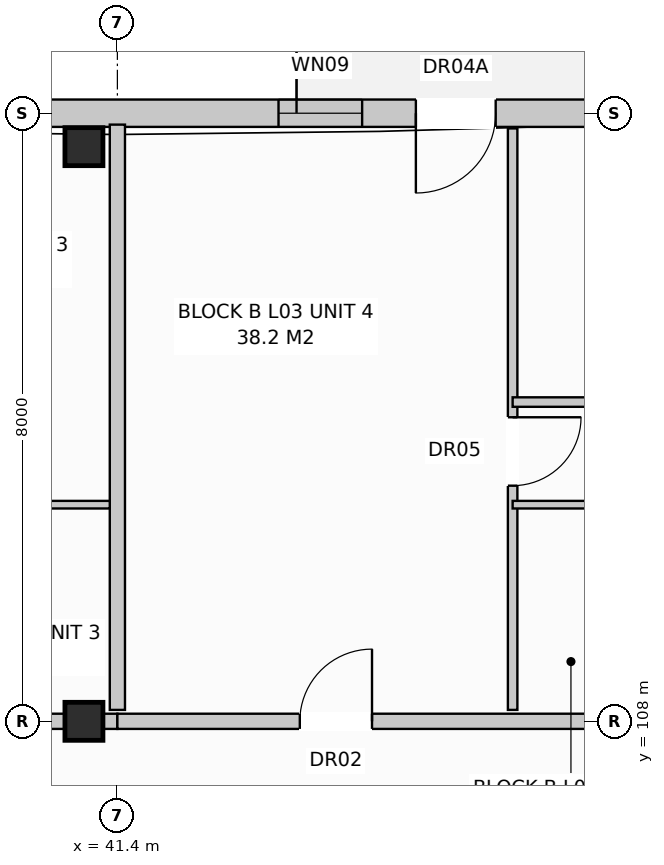
"""IFC4 building model, lengths in metres.
Left out: names, types, materials, properties, quantities, classifications, styles, units other than length and angle.
Written with IfcOpenShell. Run it as: python <this file> out.ifc"""

import sys

from ifc_helpers import new_model, si_unit, direction, frame, frame_2d, origin, origin_with_axes, origin_2d, place, context, subcontext, project, spatial, rectangle, extrude, element, fill, save


model = new_model("IFC4")
c1 = context("Model", 3, precision=1e-05, world=origin(), true_north=direction((0.0, 1.0)))
c2 = subcontext(c1, "Body", "Model", "MODEL_VIEW")
j1 = project(units=[si_unit("LENGTHUNIT", "METRE"), si_unit("PLANEANGLEUNIT", "RADIAN")], contexts=[c1])
p1 = place(None, origin())
s1 = spatial("IfcSite", under=j1, at=p1, CompositionType="ELEMENT")
p2 = place(p1, origin())
s2 = spatial("IfcBuilding", under=s1, at=p2, CompositionType="ELEMENT")
p3 = place(p2, frame((0.0, 0.0, 11.2)))
s3 = spatial("IfcBuildingStorey", under=s2, at=p3, CompositionType="ELEMENT", Elevation=11.2)
for number, where, z_axis, x_axis in (
    (1, (40.96, 108.0, 0.0), (0.0, 0.0, 1.0), (1.0, 0.0, 0.0)),
    (2, (40.96, 115.56, 0.0), (0.0, 0.0, 1.0), (1.0, 0.0, 0.0)),
):
    element("IfcColumn", number, at=place(p3, frame(where, z_axis=z_axis, x_axis=x_axis)), inside=s3, PredefinedType="COLUMN", context=c2, shape_type="SweptSolid", body=[
        extrude(rectangle(XDim=0.5, YDim=0.5, at=origin_2d()), origin(), (0.0, 0.0, 1.0), 3.2),
    ])
p4 = place(p3, frame((0.17, 116.0, 0.0), z_axis=(0.0, 0.0, 1.0), x_axis=(1.0, 0.0, 0.0)))
e3 = element("IfcWall", 3, at=p4, inside=s3, PredefinedType="STANDARD", context=c2, shape_type="SweptSolid", body=[
    extrude(rectangle(XDim=54.86, YDim=0.36, at=frame_2d((27.43, 0.0))), origin(), (0.0, 0.0, 1.0), 2.94),
])
p5 = place(p4, frame((2.777, 0.0, 0.0)))
e4 = element("IfcOpeningElement", 4, at=p5, cuts=e3, PredefinedType="OPENING", context=c2, shape_type="SweptSolid", body=[
    extrude(rectangle(XDim=1.05, YDim=2.12, at=frame_2d((0.525, 1.06))), frame((0.0, 0.192, 0.0), z_axis=(0.0, -1.0, 0.0), x_axis=(1.0, 0.0, 0.0)), (0.0, 0.0, 1.0), 0.384),
])
p6 = place(p4, frame((16.277, 0.0, 0.0)))
e5 = element("IfcOpeningElement", 5, at=p6, cuts=e3, PredefinedType="OPENING", context=c2, shape_type="SweptSolid", body=[
    extrude(rectangle(XDim=1.05, YDim=2.12, at=frame_2d((0.525, 1.06))), frame((0.0, 0.192, 0.0), z_axis=(0.0, -1.0, 0.0), x_axis=(1.0, 0.0, 0.0)), (0.0, 0.0, 1.0), 0.384),
])
p7 = place(p4, frame((30.777, 0.0, 0.0)))
e6 = element("IfcOpeningElement", 6, at=p7, cuts=e3, PredefinedType="OPENING", context=c2, shape_type="SweptSolid", body=[
    extrude(rectangle(XDim=1.05, YDim=2.12, at=frame_2d((0.525, 1.06))), frame((0.0, 0.192, 0.0), z_axis=(0.0, -1.0, 0.0), x_axis=(1.0, 0.0, 0.0)), (0.0, 0.0, 1.0), 0.384),
])
p8 = place(p4, frame((45.157, 0.0, 0.0)))
e7 = element("IfcOpeningElement", 7, at=p8, cuts=e3, PredefinedType="OPENING", context=c2, shape_type="SweptSolid", body=[
    extrude(rectangle(XDim=1.05, YDim=2.12, at=frame_2d((0.525, 1.06))), frame((0.0, 0.192, 0.0), z_axis=(0.0, -1.0, 0.0), x_axis=(1.0, 0.0, 0.0)), (0.0, 0.0, 1.0), 0.384),
])
p9 = place(p4, frame((1.05, 0.0, 0.72)))
e8 = element("IfcOpeningElement", 8, at=p9, cuts=e3, PredefinedType="OPENING", context=c2, shape_type="SweptSolid", body=[
    extrude(rectangle(XDim=1.1, YDim=1.5, at=frame_2d((0.55, 0.75))), frame((0.0, 0.192, 0.0), z_axis=(0.0, -1.0, 0.0), x_axis=(1.0, 0.0, 0.0)), (0.0, 0.0, 1.0), 0.384),
])
p10 = place(p4, frame((4.325, 0.0, 0.8)))
e9 = element("IfcOpeningElement", 9, at=p10, cuts=e3, PredefinedType="OPENING", context=c2, shape_type="SweptSolid", body=[
    extrude(rectangle(XDim=1.95, YDim=1.65, at=frame_2d((0.975, 0.825))), frame((0.0, 0.192, 0.0), z_axis=(0.0, -1.0, 0.0), x_axis=(1.0, 0.0, 0.0)), (0.0, 0.0, 1.0), 0.384),
])
p11 = place(p4, frame((10.45, 0.0, 0.72)))
e10 = element("IfcOpeningElement", 10, at=p11, cuts=e3, PredefinedType="OPENING", context=c2, shape_type="SweptSolid", body=[
    extrude(rectangle(XDim=1.1, YDim=1.5, at=frame_2d((0.55, 0.75))), frame((0.0, 0.192, 0.0), z_axis=(0.0, -1.0, 0.0), x_axis=(1.0, 0.0, 0.0)), (0.0, 0.0, 1.0), 0.384),
])
p12 = place(p4, frame((14.55, 0.0, 0.72)))
e11 = element("IfcOpeningElement", 11, at=p12, cuts=e3, PredefinedType="OPENING", context=c2, shape_type="SweptSolid", body=[
    extrude(rectangle(XDim=1.1, YDim=1.5, at=frame_2d((0.55, 0.75))), frame((0.0, 0.192, 0.0), z_axis=(0.0, -1.0, 0.0), x_axis=(1.0, 0.0, 0.0)), (0.0, 0.0, 1.0), 0.384),
])
p13 = place(p4, frame((18.025, 0.0, 0.8)))
e12 = element("IfcOpeningElement", 12, at=p13, cuts=e3, PredefinedType="OPENING", context=c2, shape_type="SweptSolid", body=[
    extrude(rectangle(XDim=1.95, YDim=1.65, at=frame_2d((0.975, 0.825))), frame((0.0, 0.192, 0.0), z_axis=(0.0, -1.0, 0.0), x_axis=(1.0, 0.0, 0.0)), (0.0, 0.0, 1.0), 0.384),
])
p14 = place(p4, frame((22.8, 0.0, 0.8)))
e13 = element("IfcOpeningElement", 13, at=p14, cuts=e3, PredefinedType="OPENING", context=c2, shape_type="SweptSolid", body=[
    extrude(rectangle(XDim=1.8, YDim=1.7, at=frame_2d((0.9, 0.85))), frame((0.0, 0.192, 0.0), z_axis=(0.0, -1.0, 0.0), x_axis=(1.0, 0.0, 0.0)), (0.0, 0.0, 1.0), 0.384),
])
p15 = place(p4, frame((28.85, 0.0, 0.72)))
e14 = element("IfcOpeningElement", 14, at=p15, cuts=e3, PredefinedType="OPENING", context=c2, shape_type="SweptSolid", body=[
    extrude(rectangle(XDim=1.1, YDim=1.5, at=frame_2d((0.55, 0.75))), frame((0.0, 0.192, 0.0), z_axis=(0.0, -1.0, 0.0), x_axis=(1.0, 0.0, 0.0)), (0.0, 0.0, 1.0), 0.384),
])
p16 = place(p4, frame((34.825, 0.0, 0.8)))
e15 = element("IfcOpeningElement", 15, at=p16, cuts=e3, PredefinedType="OPENING", context=c2, shape_type="SweptSolid", body=[
    extrude(rectangle(XDim=1.95, YDim=1.65, at=frame_2d((0.975, 0.825))), frame((0.0, 0.192, 0.0), z_axis=(0.0, -1.0, 0.0), x_axis=(1.0, 0.0, 0.0)), (0.0, 0.0, 1.0), 0.384),
])
p17 = place(p4, frame((38.65, 0.0, 0.72)))
e16 = element("IfcOpeningElement", 16, at=p17, cuts=e3, PredefinedType="OPENING", context=c2, shape_type="SweptSolid", body=[
    extrude(rectangle(XDim=1.1, YDim=1.5, at=frame_2d((0.55, 0.75))), frame((0.0, 0.192, 0.0), z_axis=(0.0, -1.0, 0.0), x_axis=(1.0, 0.0, 0.0)), (0.0, 0.0, 1.0), 0.384),
])
p18 = place(p4, frame((43.35, 0.0, 0.72)))
e17 = element("IfcOpeningElement", 17, at=p18, cuts=e3, PredefinedType="OPENING", context=c2, shape_type="SweptSolid", body=[
    extrude(rectangle(XDim=1.1, YDim=1.5, at=frame_2d((0.55, 0.75))), frame((0.0, 0.192, 0.0), z_axis=(0.0, -1.0, 0.0), x_axis=(1.0, 0.0, 0.0)), (0.0, 0.0, 1.0), 0.384),
])
p19 = place(p4, frame((48.583, 0.0, 0.8)))
e18 = element("IfcOpeningElement", 18, at=p19, cuts=e3, PredefinedType="OPENING", context=c2, shape_type="SweptSolid", body=[
    extrude(rectangle(XDim=1.95, YDim=1.65, at=frame_2d((0.975, 0.825))), frame((0.0, 0.192, 0.0), z_axis=(0.0, -1.0, 0.0), x_axis=(1.0, 0.0, 0.0)), (0.0, 0.0, 1.0), 0.384),
])
p20 = place(p4, frame((52.25, 0.0, 0.72)))
e19 = element("IfcOpeningElement", 19, at=p20, cuts=e3, PredefinedType="OPENING", context=c2, shape_type="SweptSolid", body=[
    extrude(rectangle(XDim=1.1, YDim=1.5, at=frame_2d((0.55, 0.75))), frame((0.0, 0.192, 0.0), z_axis=(0.0, -1.0, 0.0), x_axis=(1.0, 0.0, 0.0)), (0.0, 0.0, 1.0), 0.384),
])
p21 = place(p3, frame((41.4, 108.15, 0.0), z_axis=(0.0, 0.0, 1.0), x_axis=(0.0, 1.0, 0.0)))
e20 = element("IfcWall", 20, at=p21, inside=s3, PredefinedType="PARTITIONING", context=c2, shape_type="SweptSolid", body=[
    extrude(rectangle(XDim=7.7, YDim=0.2, at=frame_2d((3.85, 0.0))), origin(), (0.0, 0.0, 1.0), 2.94),
])
p22 = place(p3, frame((20.7, 108.0, 0.0), z_axis=(0.0, 0.0, 1.0), x_axis=(1.0, 0.0, 0.0)))
e21 = element("IfcWall", 21, at=p22, inside=s3, PredefinedType="PARTITIONING", context=c2, shape_type="SweptSolid", body=[
    extrude(rectangle(XDim=20.7, YDim=0.2, at=frame_2d((10.35, 0.0))), origin(), (0.0, 0.0, 1.0), 2.38),
])
p23 = place(p22, frame((2.4, 0.0, 0.0)))
e22 = element("IfcOpeningElement", 22, at=p23, cuts=e21, PredefinedType="OPENING", context=c2, shape_type="SweptSolid", body=[
    extrude(rectangle(XDim=0.95, YDim=2.15, at=frame_2d((0.475, 1.075))), frame((0.0, 0.112, 0.0), z_axis=(0.0, -1.0, 0.0), x_axis=(1.0, 0.0, 0.0)), (0.0, 0.0, 1.0), 0.224),
])
p24 = place(p3, frame((27.0, 110.85, 0.0), z_axis=(0.0, 0.0, 1.0), x_axis=(1.0, 0.0, 0.0)))
e23 = element("IfcWall", 23, at=p24, inside=s3, PredefinedType="PARTITIONING", context=c2, shape_type="SweptSolid", body=[
    extrude(rectangle(XDim=14.3, YDim=0.1, at=frame_2d((7.15, 0.0))), origin(), (0.0, 0.0, 1.0), 2.94),
])
p25 = place(p24, frame((1.6, 0.0, 0.0)))
e24 = element("IfcOpeningElement", 24, at=p25, cuts=e23, PredefinedType="OPENING", context=c2, shape_type="SweptSolid", body=[
    extrude(rectangle(XDim=0.9, YDim=2.1, at=frame_2d((0.45, 1.05))), frame((0.0, 0.062, 0.0), z_axis=(0.0, -1.0, 0.0), x_axis=(1.0, 0.0, 0.0)), (0.0, 0.0, 1.0), 0.124),
])
p26 = place(p24, frame((5.1, 0.0, 0.0)))
e25 = element("IfcOpeningElement", 25, at=p26, cuts=e23, PredefinedType="OPENING", context=c2, shape_type="SweptSolid", body=[
    extrude(rectangle(XDim=0.85, YDim=2.05, at=frame_2d((0.425, 1.025))), frame((0.0, 0.062, 0.0), z_axis=(0.0, -1.0, 0.0), x_axis=(1.0, 0.0, 0.0)), (0.0, 0.0, 1.0), 0.124),
])
p27 = place(p24, frame((8.2, 0.0, 0.0)))
e26 = element("IfcOpeningElement", 26, at=p27, cuts=e23, PredefinedType="OPENING", context=c2, shape_type="SweptSolid", body=[
    extrude(rectangle(XDim=0.85, YDim=2.05, at=frame_2d((0.425, 1.025))), frame((0.0, 0.062, 0.0), z_axis=(0.0, -1.0, 0.0), x_axis=(1.0, 0.0, 0.0)), (0.0, 0.0, 1.0), 0.124),
])
p28 = place(p24, frame((11.6, 0.0, 0.0)))
e27 = element("IfcOpeningElement", 27, at=p28, cuts=e23, PredefinedType="OPENING", context=c2, shape_type="SweptSolid", body=[
    extrude(rectangle(XDim=0.85, YDim=2.05, at=frame_2d((0.425, 1.025))), frame((0.0, 0.062, 0.0), z_axis=(0.0, -1.0, 0.0), x_axis=(1.0, 0.0, 0.0)), (0.0, 0.0, 1.0), 0.124),
])
p29 = place(p3, frame((41.4, 108.0, 0.0), z_axis=(0.0, 0.0, 1.0), x_axis=(1.0, 0.0, 0.0)))
e28 = element("IfcWall", 28, at=p29, inside=s3, PredefinedType="PARTITIONING", context=c2, shape_type="SweptSolid", body=[
    extrude(rectangle(XDim=13.8, YDim=0.2, at=frame_2d((6.9, 0.0))), origin(), (0.0, 0.0, 1.0), 2.38),
])
p30 = place(p29, frame((2.4, 0.0, 0.0)))
e29 = element("IfcOpeningElement", 29, at=p30, cuts=e28, PredefinedType="OPENING", context=c2, shape_type="SweptSolid", body=[
    extrude(rectangle(XDim=0.95, YDim=2.15, at=frame_2d((0.475, 1.075))), frame((0.0, 0.112, 0.0), z_axis=(0.0, -1.0, 0.0), x_axis=(1.0, 0.0, 0.0)), (0.0, 0.0, 1.0), 0.224),
])
p31 = place(p3, frame((46.6, 108.15, 0.0), z_axis=(0.0, 0.0, 1.0), x_axis=(0.0, 1.0, 0.0)))
e30 = element("IfcWall", 30, at=p31, inside=s3, PredefinedType="PARTITIONING", context=c2, shape_type="SweptSolid", body=[
    extrude(rectangle(XDim=7.65, YDim=0.125, at=frame_2d((3.825, 0.0))), origin(), (0.0, 0.0, 1.0), 2.94),
])
p32 = place(p31, frame((2.95, 0.0, 0.0)))
e31 = element("IfcOpeningElement", 31, at=p32, cuts=e30, PredefinedType="OPENING", context=c2, shape_type="SweptSolid", body=[
    extrude(rectangle(XDim=0.9, YDim=2.1, at=frame_2d((0.45, 1.05))), frame((0.0, 0.074, 0.0), z_axis=(0.0, -1.0, 0.0), x_axis=(1.0, 0.0, 0.0)), (0.0, 0.0, 1.0), 0.149),
])
p33 = place(p3, frame((46.6, 110.85, 0.0), z_axis=(0.0, 0.0, 1.0), x_axis=(1.0, 0.0, 0.0)))
e32 = element("IfcWall", 32, at=p33, inside=s3, PredefinedType="PARTITIONING", context=c2, shape_type="SweptSolid", body=[
    extrude(rectangle(XDim=8.5, YDim=0.1, at=frame_2d((4.25, 0.0))), origin(), (0.0, 0.0, 1.0), 2.94),
])
p34 = place(p33, frame((1.0, 0.0, 0.0)))
e33 = element("IfcOpeningElement", 33, at=p34, cuts=e32, PredefinedType="OPENING", context=c2, shape_type="SweptSolid", body=[
    extrude(rectangle(XDim=0.85, YDim=2.1, at=frame_2d((0.425, 1.05))), frame((0.0, 0.062, 0.0), z_axis=(0.0, -1.0, 0.0), x_axis=(1.0, 0.0, 0.0)), (0.0, 0.0, 1.0), 0.124),
])
p35 = place(p33, frame((3.4, 0.0, 0.0)))
e34 = element("IfcOpeningElement", 34, at=p35, cuts=e32, PredefinedType="OPENING", context=c2, shape_type="SweptSolid", body=[
    extrude(rectangle(XDim=0.85, YDim=2.05, at=frame_2d((0.425, 1.025))), frame((0.0, 0.062, 0.0), z_axis=(0.0, -1.0, 0.0), x_axis=(1.0, 0.0, 0.0)), (0.0, 0.0, 1.0), 0.124),
])
p36 = place(p33, frame((6.2, 0.0, 0.0)))
e35 = element("IfcOpeningElement", 35, at=p36, cuts=e32, PredefinedType="OPENING", context=c2, shape_type="SweptSolid", body=[
    extrude(rectangle(XDim=0.85, YDim=2.05, at=frame_2d((0.425, 1.025))), frame((0.0, 0.062, 0.0), z_axis=(0.0, -1.0, 0.0), x_axis=(1.0, 0.0, 0.0)), (0.0, 0.0, 1.0), 0.124),
])
p37 = place(p3, frame((46.6, 112.2, 0.0), z_axis=(0.0, 0.0, 1.0), x_axis=(1.0, 0.0, 0.0)))
e36 = element("IfcWall", 36, at=p37, inside=s3, PredefinedType="PARTITIONING", context=c2, shape_type="SweptSolid", body=[
    extrude(rectangle(XDim=8.5, YDim=0.125, at=frame_2d((4.25, 0.0))), origin(), (0.0, 0.0, 1.0), 2.94),
])
p38 = place(p37, frame((1.5, 0.0, 0.0)))
e37 = element("IfcOpeningElement", 37, at=p38, cuts=e36, PredefinedType="OPENING", context=c2, shape_type="SweptSolid", body=[
    extrude(rectangle(XDim=0.9, YDim=2.1, at=frame_2d((0.45, 1.05))), frame((0.0, 0.074, 0.0), z_axis=(0.0, -1.0, 0.0), x_axis=(1.0, 0.0, 0.0)), (0.0, 0.0, 1.0), 0.149),
])
p39 = place(p37, frame((5.6, 0.0, 0.0)))
e38 = element("IfcOpeningElement", 38, at=p39, cuts=e36, PredefinedType="OPENING", context=c2, shape_type="SweptSolid", body=[
    extrude(rectangle(XDim=0.9, YDim=2.1, at=frame_2d((0.45, 1.05))), frame((0.0, 0.074, 0.0), z_axis=(0.0, -1.0, 0.0), x_axis=(1.0, 0.0, 0.0)), (0.0, 0.0, 1.0), 0.149),
])
p40 = place(p8, frame((1.05, 0.0, 0.0), z_axis=(0.0, 0.0, 1.0), x_axis=(-1.0, 0.0, 0.0)))
e39 = element("IfcDoor", 39, at=p40, inside=s3, OperationType="SINGLE_SWING_LEFT", PredefinedType="DOOR", context=c2, shape_type="SweptSolid", body=[
    extrude(rectangle(XDim=1.05, YDim=2.12, at=frame_2d((0.525, 1.06))), frame((0.0, 0.025, 0.0), z_axis=(0.0, -1.0, 0.0), x_axis=(1.0, 0.0, 0.0)), (0.0, 0.0, 1.0), 0.05),
])
fill(e7, e39)
p41 = place(p18, origin_with_axes())
e40 = element("IfcWindow", 40, at=p41, inside=s3, PartitioningType="SINGLE_PANEL", PredefinedType="WINDOW", context=c2, shape_type="SweptSolid", body=[
    extrude(rectangle(XDim=1.1, YDim=1.5, at=frame_2d((0.55, 0.75))), frame((0.0, 0.03, 0.0), z_axis=(0.0, -1.0, 0.0), x_axis=(1.0, 0.0, 0.0)), (0.0, 0.0, 1.0), 0.06),
])
fill(e17, e40)
p42 = place(p30, origin_with_axes())
e41 = element("IfcDoor", 41, at=p42, inside=s3, OperationType="SINGLE_SWING_RIGHT", PredefinedType="DOOR", context=c2, shape_type="SweptSolid", body=[
    extrude(rectangle(XDim=0.95, YDim=2.15, at=frame_2d((0.475, 1.075))), frame((0.0, 0.025, 0.0), z_axis=(0.0, -1.0, 0.0), x_axis=(1.0, 0.0, 0.0)), (0.0, 0.0, 1.0), 0.05),
])
fill(e29, e41)
p43 = place(p32, frame((0.9, 0.0, 0.0), z_axis=(0.0, 0.0, 1.0), x_axis=(-1.0, 0.0, 0.0)))
e42 = element("IfcDoor", 42, at=p43, inside=s3, OperationType="SINGLE_SWING_RIGHT", PredefinedType="DOOR", context=c2, shape_type="SweptSolid", body=[
    extrude(rectangle(XDim=0.9, YDim=2.1, at=frame_2d((0.45, 1.05))), frame((0.0, 0.025, 0.0), z_axis=(0.0, -1.0, 0.0), x_axis=(1.0, 0.0, 0.0)), (0.0, 0.0, 1.0), 0.05),
])
fill(e31, e42)
save(model, sys.argv[1])
